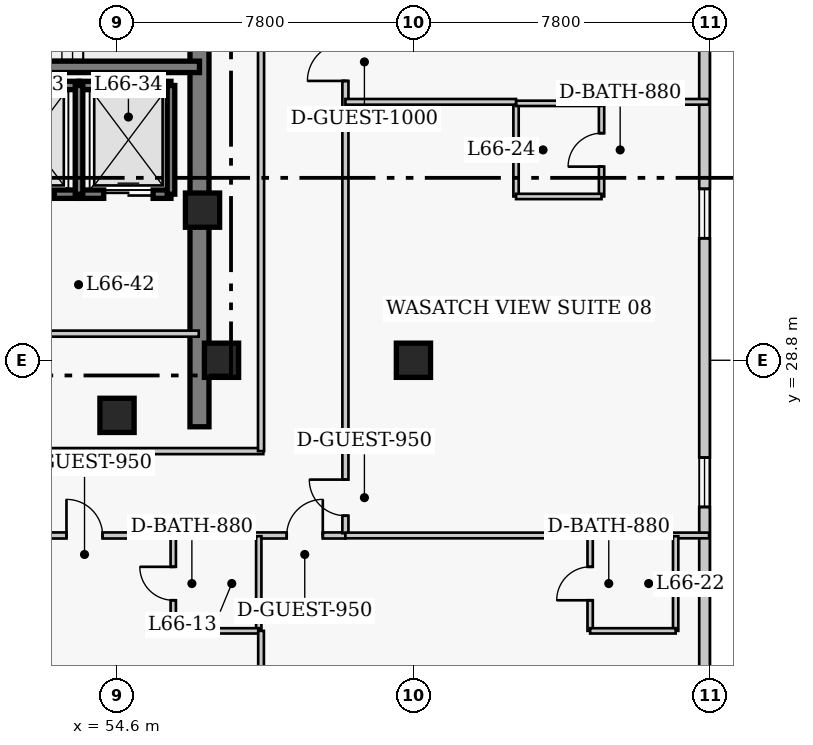
"""IFC4 building model, lengths in metres.
Left out: names, types, materials, properties, quantities, classifications, styles, units other than length and angle.
Written with IfcOpenShell. Run it as: python <this file> out.ifc"""

import sys

from ifc_helpers import new_model, si_unit, direction, frame, frame_2d, origin, origin_2d, place, context, subcontext, project, spatial, rectangle, extrude, element, fill, save


model = new_model("IFC4")
c1 = context("Model", 3, precision=1e-05, world=origin(), true_north=direction((0.0, 1.0)))
c2 = subcontext(c1, "Body", "Model", "MODEL_VIEW")
j1 = project(units=[si_unit("LENGTHUNIT", "METRE"), si_unit("PLANEANGLEUNIT", "RADIAN")], contexts=[c1])
p1 = place(None, origin())
s1 = spatial("IfcSite", under=j1, at=p1, CompositionType="ELEMENT")
p2 = place(p1, origin())
s2 = spatial("IfcBuilding", under=s1, at=p2, CompositionType="ELEMENT")
p3 = place(p2, frame((0.0, 0.0, 265.4)))
s3 = spatial("IfcBuildingStorey", under=s2, at=p3, CompositionType="ELEMENT", Elevation=265.4)
p4 = place(p3, frame((56.77, 27.05, 0.0), z_axis=(0.0, 0.0, 1.0), x_axis=(0.0, 1.0, 0.0)))
e1 = element("IfcWall", 1, at=p4, inside=s3, PredefinedType="SHEAR", context=c2, shape_type="SweptSolid", body=[
    extrude(rectangle(XDim=13.52, YDim=0.5, at=frame_2d((6.76, 0.0))), origin(), (0.0, 0.0, 1.0), 4.0),
])
p5 = place(p3, frame((48.45, 36.52, 0.0), z_axis=(0.0, 0.0, 1.0), x_axis=(1.0, 0.0, 0.0)))
e2 = element("IfcWall", 2, at=p5, inside=s3, PredefinedType="SHEAR", context=c2, shape_type="SweptSolid", body=[
    extrude(rectangle(XDim=8.32, YDim=0.3, at=frame_2d((4.16, 0.0))), origin(), (0.0, 0.0, 1.0), 4.0),
])
for number, where, z_axis, x_axis in (
    (3, (62.4, 28.8, 0.0), (0.0, 0.0, 1.0), (1.0, 0.0, 0.0)),
    (4, (57.35, 28.8, 0.0), (0.0, 0.0, 1.0), (1.0, 0.0, 0.0)),
    (5, (54.6, 27.35, 0.0), (0.0, 0.0, 1.0), (1.0, 0.0, 0.0)),
    (6, (56.85, 32.75, 0.0), (0.0, 0.0, 1.0), (1.0, 0.0, 0.0)),
):
    element("IfcColumn", number, at=place(p3, frame(where, z_axis=z_axis, x_axis=x_axis)), inside=s3, PredefinedType="COLUMN", context=c2, shape_type="SweptSolid", body=[
        extrude(rectangle(XDim=0.9, YDim=0.9, at=origin_2d()), origin(), (0.0, 0.0, 1.0), 4.0),
    ])
p6 = place(p3, frame((70.06, 13.36, 0.0), z_axis=(0.0, 0.0, 1.0), x_axis=(0.0, 1.0, 0.0)))
e7 = element("IfcWall", 7, at=p6, inside=s3, PredefinedType="SOLIDWALL", context=c2, shape_type="SweptSolid", body=[
    extrude(rectangle(XDim=30.88, YDim=0.28, at=frame_2d((15.44, 0.0))), origin(), (0.0, 0.0, 1.0), 3.76),
])
p7 = place(p6, frame((3.21, 0.0, 0.85)))
e8 = element("IfcOpeningElement", 8, at=p7, cuts=e7, PredefinedType="OPENING", context=c2, shape_type="SweptSolid", body=[
    extrude(rectangle(XDim=1.3, YDim=1.7, at=frame_2d((0.65, 0.85))), frame((0.0, 0.15, 0.0), z_axis=(0.0, -1.0, 0.0), x_axis=(1.0, 0.0, 0.0)), (0.0, 0.0, 1.0), 0.3),
])
p8 = place(p6, frame((11.58, 0.0, 0.85)))
e9 = element("IfcOpeningElement", 9, at=p8, cuts=e7, PredefinedType="OPENING", context=c2, shape_type="SweptSolid", body=[
    extrude(rectangle(XDim=1.3, YDim=1.7, at=frame_2d((0.65, 0.85))), frame((0.0, 0.15, 0.0), z_axis=(0.0, -1.0, 0.0), x_axis=(1.0, 0.0, 0.0)), (0.0, 0.0, 1.0), 0.3),
])
p9 = place(p6, frame((18.65, 0.0, 0.85)))
e10 = element("IfcOpeningElement", 10, at=p9, cuts=e7, PredefinedType="OPENING", context=c2, shape_type="SweptSolid", body=[
    extrude(rectangle(XDim=1.3, YDim=1.7, at=frame_2d((0.65, 0.85))), frame((0.0, 0.15, 0.0), z_axis=(0.0, -1.0, 0.0), x_axis=(1.0, 0.0, 0.0)), (0.0, 0.0, 1.0), 0.3),
])
p10 = place(p6, frame((26.37, 0.0, 0.85)))
e11 = element("IfcOpeningElement", 11, at=p10, cuts=e7, PredefinedType="OPENING", context=c2, shape_type="SweptSolid", body=[
    extrude(rectangle(XDim=1.3, YDim=1.7, at=frame_2d((0.65, 0.85))), frame((0.0, 0.15, 0.0), z_axis=(0.0, -1.0, 0.0), x_axis=(1.0, 0.0, 0.0)), (0.0, 0.0, 1.0), 0.3),
])
p11 = place(p3, frame((51.18, 36.03, 0.0), z_axis=(0.0, 0.0, 1.0), x_axis=(1.0, 0.0, 0.0)))
e12 = element("IfcWall", 12, at=p11, inside=s3, PredefinedType="SHEAR", context=c2, shape_type="SweptSolid", body=[
    extrude(rectangle(XDim=2.42, YDim=0.22, at=frame_2d((1.21, 0.0))), origin(), (0.0, 0.0, 1.0), 4.0),
])
p12 = place(p3, frame((51.18, 33.17, 0.0), z_axis=(0.0, 0.0, 1.0), x_axis=(1.0, 0.0, 0.0)))
e13 = element("IfcWall", 13, at=p12, inside=s3, PredefinedType="SHEAR", context=c2, shape_type="SweptSolid", body=[
    extrude(rectangle(XDim=2.42, YDim=0.22, at=frame_2d((1.21, 0.0))), origin(), (0.0, 0.0, 1.0), 4.0),
])
p13 = place(p12, frame((0.47, 0.0, 0.0)))
e14 = element("IfcOpeningElement", 14, at=p13, cuts=e13, PredefinedType="OPENING", context=c2, shape_type="SweptSolid", body=[
    extrude(rectangle(XDim=1.3, YDim=2.15, at=frame_2d((0.65, 1.075))), frame((0.0, 0.12, 0.0), z_axis=(0.0, -1.0, 0.0), x_axis=(1.0, 0.0, 0.0)), (0.0, 0.0, 1.0), 0.24),
])
p14 = place(p3, frame((53.6, 36.03, 0.0), z_axis=(0.0, 0.0, 1.0), x_axis=(1.0, 0.0, 0.0)))
e15 = element("IfcWall", 15, at=p14, inside=s3, PredefinedType="SHEAR", context=c2, shape_type="SweptSolid", body=[
    extrude(rectangle(XDim=2.42, YDim=0.22, at=frame_2d((1.21, 0.0))), origin(), (0.0, 0.0, 1.0), 4.0),
])
p15 = place(p3, frame((53.6, 33.17, 0.0), z_axis=(0.0, 0.0, 1.0), x_axis=(1.0, 0.0, 0.0)))
e16 = element("IfcWall", 16, at=p15, inside=s3, PredefinedType="SHEAR", context=c2, shape_type="SweptSolid", body=[
    extrude(rectangle(XDim=2.42, YDim=0.22, at=frame_2d((1.21, 0.0))), origin(), (0.0, 0.0, 1.0), 4.0),
])
p16 = place(p15, frame((0.65, 0.0, 0.0)))
e17 = element("IfcOpeningElement", 17, at=p16, cuts=e16, PredefinedType="OPENING", context=c2, shape_type="SweptSolid", body=[
    extrude(rectangle(XDim=1.3, YDim=2.15, at=frame_2d((0.65, 1.075))), frame((0.0, 0.12, 0.0), z_axis=(0.0, -1.0, 0.0), x_axis=(1.0, 0.0, 0.0)), (0.0, 0.0, 1.0), 0.24),
])
for number, where, z_axis, x_axis in (
    (18, (53.6, 33.17, 0.0), (0.0, 0.0, 1.0), (0.0, 1.0, 0.0)),
    (19, (56.02, 33.17, 0.0), (0.0, 0.0, 1.0), (0.0, 1.0, 0.0)),
):
    element("IfcWall", number, at=place(p3, frame(where, z_axis=z_axis, x_axis=x_axis)), inside=s3, PredefinedType="SHEAR", context=c2, shape_type="SweptSolid", body=[
        extrude(rectangle(XDim=2.86, YDim=0.2, at=frame_2d((1.43, 0.0))), origin(), (0.0, 0.0, 1.0), 4.0),
    ])
p17 = place(p3, frame((51.12, 29.5, 0.0), z_axis=(0.0, 0.0, 1.0), x_axis=(1.0, 0.0, 0.0)))
e20 = element("IfcWall", 20, at=p17, inside=s3, PredefinedType="PARTITIONING", context=c2, shape_type="SweptSolid", body=[
    extrude(rectangle(XDim=5.63, YDim=0.16, at=frame_2d((2.815, 0.0))), origin(), (0.0, 0.0, 1.0), 3.76),
])
p18 = place(p3, frame((35.85, 26.41, 0.0), z_axis=(0.0, 0.0, 1.0), x_axis=(1.0, 0.0, 0.0)))
e21 = element("IfcWall", 21, at=p18, inside=s3, PredefinedType="PARTITIONING", context=c2, shape_type="SweptSolid", body=[
    extrude(rectangle(XDim=22.6, YDim=0.16, at=frame_2d((11.3, 0.0))), origin(), (0.0, 0.0, 1.0), 3.76),
])
p19 = place(p18, frame((4.55, 0.0, 0.0)))
e22 = element("IfcOpeningElement", 22, at=p19, cuts=e21, PredefinedType="OPENING", context=c2, shape_type="SweptSolid", body=[
    extrude(rectangle(XDim=1.0, YDim=2.15, at=frame_2d((0.5, 1.075))), frame((0.0, 0.09, 0.0), z_axis=(0.0, -1.0, 0.0), x_axis=(1.0, 0.0, 0.0)), (0.0, 0.0, 1.0), 0.18),
])
p20 = place(p18, frame((12.05, 0.0, 0.0)))
e23 = element("IfcOpeningElement", 23, at=p20, cuts=e21, PredefinedType="OPENING", context=c2, shape_type="SweptSolid", body=[
    extrude(rectangle(XDim=1.0, YDim=2.15, at=frame_2d((0.5, 1.075))), frame((0.0, 0.09, 0.0), z_axis=(0.0, -1.0, 0.0), x_axis=(1.0, 0.0, 0.0)), (0.0, 0.0, 1.0), 0.18),
])
p21 = place(p3, frame((35.8, 24.19, 0.0), z_axis=(0.0, 0.0, 1.0), x_axis=(1.0, 0.0, 0.0)))
e24 = element("IfcWall", 24, at=p21, inside=s3, PredefinedType="PARTITIONING", context=c2, shape_type="SweptSolid", body=[
    extrude(rectangle(XDim=24.81, YDim=0.16, at=frame_2d((12.405, 0.0))), origin(), (0.0, 0.0, 1.0), 3.76),
])
p22 = place(p21, frame((2.115, 0.0, 0.0)))
e25 = element("IfcOpeningElement", 25, at=p22, cuts=e24, PredefinedType="OPENING", context=c2, shape_type="SweptSolid", body=[
    extrude(rectangle(XDim=0.95, YDim=2.1, at=frame_2d((0.475, 1.05))), frame((0.0, 0.09, 0.0), z_axis=(0.0, -1.0, 0.0), x_axis=(1.0, 0.0, 0.0)), (0.0, 0.0, 1.0), 0.18),
])
p23 = place(p21, frame((11.345, 0.0, 0.0)))
e26 = element("IfcOpeningElement", 26, at=p23, cuts=e24, PredefinedType="OPENING", context=c2, shape_type="SweptSolid", body=[
    extrude(rectangle(XDim=1.0, YDim=2.15, at=frame_2d((0.5, 1.075))), frame((0.0, 0.09, 0.0), z_axis=(0.0, -1.0, 0.0), x_axis=(1.0, 0.0, 0.0)), (0.0, 0.0, 1.0), 0.18),
])
p24 = place(p21, frame((17.47, 0.0, 0.0)))
e27 = element("IfcOpeningElement", 27, at=p24, cuts=e24, PredefinedType="OPENING", context=c2, shape_type="SweptSolid", body=[
    extrude(rectangle(XDim=0.95, YDim=2.1, at=frame_2d((0.475, 1.05))), frame((0.0, 0.09, 0.0), z_axis=(0.0, -1.0, 0.0), x_axis=(1.0, 0.0, 0.0)), (0.0, 0.0, 1.0), 0.18),
])
p25 = place(p21, frame((23.265, 0.0, 0.0)))
e28 = element("IfcOpeningElement", 28, at=p25, cuts=e24, PredefinedType="OPENING", context=c2, shape_type="SweptSolid", body=[
    extrude(rectangle(XDim=0.95, YDim=2.1, at=frame_2d((0.475, 1.05))), frame((0.0, 0.09, 0.0), z_axis=(0.0, -1.0, 0.0), x_axis=(1.0, 0.0, 0.0)), (0.0, 0.0, 1.0), 0.18),
])
p26 = place(p3, frame((60.61, 24.25, 0.0), z_axis=(0.0, 0.0, 1.0), x_axis=(0.0, 1.0, 0.0)))
e29 = element("IfcWall", 29, at=p26, inside=s3, PredefinedType="PARTITIONING", context=c2, shape_type="SweptSolid", body=[
    extrude(rectangle(XDim=16.4, YDim=0.16, at=frame_2d((8.2, 0.0))), origin(), (0.0, 0.0, 1.0), 3.76),
])
p27 = place(p26, frame((0.46, 0.0, 0.0)))
e30 = element("IfcOpeningElement", 30, at=p27, cuts=e29, PredefinedType="OPENING", context=c2, shape_type="SweptSolid", body=[
    extrude(rectangle(XDim=0.95, YDim=2.1, at=frame_2d((0.475, 1.05))), frame((0.0, 0.09, 0.0), z_axis=(0.0, -1.0, 0.0), x_axis=(1.0, 0.0, 0.0)), (0.0, 0.0, 1.0), 0.18),
])
p28 = place(p26, frame((11.9, 0.0, 0.0)))
e31 = element("IfcOpeningElement", 31, at=p28, cuts=e29, PredefinedType="OPENING", context=c2, shape_type="SweptSolid", body=[
    extrude(rectangle(XDim=1.0, YDim=2.15, at=frame_2d((0.5, 1.075))), frame((0.0, 0.09, 0.0), z_axis=(0.0, -1.0, 0.0), x_axis=(1.0, 0.0, 0.0)), (0.0, 0.0, 1.0), 0.18),
])
p29 = place(p3, frame((58.39, 26.41, 0.0), z_axis=(0.0, 0.0, 1.0), x_axis=(0.0, 1.0, 0.0)))
e32 = element("IfcWall", 32, at=p29, inside=s3, PredefinedType="PARTITIONING", context=c2, shape_type="SweptSolid", body=[
    extrude(rectangle(XDim=14.24, YDim=0.16, at=frame_2d((7.12, 0.0))), origin(), (0.0, 0.0, 1.0), 3.76),
])
p30 = place(p3, frame((56.08, 21.68, 0.0), z_axis=(0.0, 0.0, 1.0), x_axis=(0.0, 1.0, 0.0)))
e33 = element("IfcWall", 33, at=p30, inside=s3, PredefinedType="PLUMBINGWALL", context=c2, shape_type="SweptSolid", body=[
    extrude(rectangle(XDim=2.49, YDim=0.14, at=frame_2d((1.245, 0.0))), origin(), (0.0, 0.0, 1.0), 3.76),
])
p31 = place(p30, frame((0.805, 0.0, 0.0)))
e34 = element("IfcOpeningElement", 34, at=p31, cuts=e33, PredefinedType="OPENING", context=c2, shape_type="SweptSolid", body=[
    extrude(rectangle(XDim=0.88, YDim=2.05, at=frame_2d((0.44, 1.025))), frame((0.0, 0.08, 0.0), z_axis=(0.0, -1.0, 0.0), x_axis=(1.0, 0.0, 0.0)), (0.0, 0.0, 1.0), 0.16),
])
p32 = place(p3, frame((58.33, 21.68, 0.0), z_axis=(0.0, 0.0, 1.0), x_axis=(0.0, 1.0, 0.0)))
e35 = element("IfcWall", 35, at=p32, inside=s3, PredefinedType="PLUMBINGWALL", context=c2, shape_type="SweptSolid", body=[
    extrude(rectangle(XDim=2.49, YDim=0.14, at=frame_2d((1.245, 0.0))), origin(), (0.0, 0.0, 1.0), 3.76),
])
p33 = place(p3, frame((56.08, 21.68, 0.0), z_axis=(0.0, 0.0, 1.0), x_axis=(1.0, 0.0, 0.0)))
e36 = element("IfcWall", 36, at=p33, inside=s3, PredefinedType="PLUMBINGWALL", context=c2, shape_type="SweptSolid", body=[
    extrude(rectangle(XDim=2.25, YDim=0.14, at=frame_2d((1.125, 0.0))), origin(), (0.0, 0.0, 1.0), 3.76),
])
p34 = place(p3, frame((58.39, 9.72, 0.0), z_axis=(0.0, 0.0, 1.0), x_axis=(0.0, 1.0, 0.0)))
e37 = element("IfcWall", 37, at=p34, inside=s3, PredefinedType="PARTITIONING", context=c2, shape_type="SweptSolid", body=[
    extrude(rectangle(XDim=11.96, YDim=0.15, at=frame_2d((5.98, 0.0))), origin(), (0.0, 0.0, 1.0), 3.356),
])
p35 = place(p3, frame((60.61, 24.19, 0.0), z_axis=(0.0, 0.0, 1.0), x_axis=(1.0, 0.0, 0.0)))
e38 = element("IfcWall", 38, at=p35, inside=s3, PredefinedType="PARTITIONING", context=c2, shape_type="SweptSolid", body=[
    extrude(rectangle(XDim=9.57, YDim=0.15, at=frame_2d((4.785, 0.0))), origin(), (0.0, 0.0, 1.0), 3.76),
])
p36 = place(p3, frame((67.05, 21.68, 0.0), z_axis=(0.0, 0.0, 1.0), x_axis=(0.0, 1.0, 0.0)))
e39 = element("IfcWall", 39, at=p36, inside=s3, PredefinedType="PLUMBINGWALL", context=c2, shape_type="SweptSolid", body=[
    extrude(rectangle(XDim=2.49, YDim=0.14, at=frame_2d((1.245, 0.0))), origin(), (0.0, 0.0, 1.0), 3.76),
])
p37 = place(p36, frame((0.805, 0.0, 0.0)))
e40 = element("IfcOpeningElement", 40, at=p37, cuts=e39, PredefinedType="OPENING", context=c2, shape_type="SweptSolid", body=[
    extrude(rectangle(XDim=0.88, YDim=2.05, at=frame_2d((0.44, 1.025))), frame((0.0, 0.08, 0.0), z_axis=(0.0, -1.0, 0.0), x_axis=(1.0, 0.0, 0.0)), (0.0, 0.0, 1.0), 0.16),
])
p38 = place(p3, frame((69.3, 21.68, 0.0), z_axis=(0.0, 0.0, 1.0), x_axis=(0.0, 1.0, 0.0)))
e41 = element("IfcWall", 41, at=p38, inside=s3, PredefinedType="PLUMBINGWALL", context=c2, shape_type="SweptSolid", body=[
    extrude(rectangle(XDim=2.49, YDim=0.14, at=frame_2d((1.245, 0.0))), origin(), (0.0, 0.0, 1.0), 3.76),
])
p39 = place(p3, frame((67.05, 21.68, 0.0), z_axis=(0.0, 0.0, 1.0), x_axis=(1.0, 0.0, 0.0)))
e42 = element("IfcWall", 42, at=p39, inside=s3, PredefinedType="PLUMBINGWALL", context=c2, shape_type="SweptSolid", body=[
    extrude(rectangle(XDim=2.25, YDim=0.14, at=frame_2d((1.125, 0.0))), origin(), (0.0, 0.0, 1.0), 3.76),
])
p40 = place(p3, frame((65.1, 33.11, 0.0), z_axis=(0.0, 0.0, 1.0), x_axis=(0.0, 1.0, 0.0)))
e43 = element("IfcWall", 43, at=p40, inside=s3, PredefinedType="PLUMBINGWALL", context=c2, shape_type="SweptSolid", body=[
    extrude(rectangle(XDim=2.45, YDim=0.14, at=frame_2d((1.225, 0.0))), origin(), (0.0, 0.0, 1.0), 3.76),
])
p41 = place(p3, frame((67.35, 33.11, 0.0), z_axis=(0.0, 0.0, 1.0), x_axis=(0.0, 1.0, 0.0)))
e44 = element("IfcWall", 44, at=p41, inside=s3, PredefinedType="PLUMBINGWALL", context=c2, shape_type="SweptSolid", body=[
    extrude(rectangle(XDim=2.45, YDim=0.14, at=frame_2d((1.225, 0.0))), origin(), (0.0, 0.0, 1.0), 3.76),
])
p42 = place(p41, frame((0.785, 0.0, 0.0)))
e45 = element("IfcOpeningElement", 45, at=p42, cuts=e44, PredefinedType="OPENING", context=c2, shape_type="SweptSolid", body=[
    extrude(rectangle(XDim=0.88, YDim=2.05, at=frame_2d((0.44, 1.025))), frame((0.0, 0.08, 0.0), z_axis=(0.0, -1.0, 0.0), x_axis=(1.0, 0.0, 0.0)), (0.0, 0.0, 1.0), 0.16),
])
for number, where, z_axis, x_axis in (
    (46, (65.1, 33.11, 0.0), (0.0, 0.0, 1.0), (1.0, 0.0, 0.0)),
    (47, (65.1, 35.56, 0.0), (0.0, 0.0, 1.0), (1.0, 0.0, 0.0)),
):
    element("IfcWall", number, at=place(p3, frame(where, z_axis=z_axis, x_axis=x_axis)), inside=s3, PredefinedType="PLUMBINGWALL", context=c2, shape_type="SweptSolid", body=[
        extrude(rectangle(XDim=2.25, YDim=0.14, at=frame_2d((1.125, 0.0))), origin(), (0.0, 0.0, 1.0), 3.76),
    ])
p43 = place(p3, frame((60.61, 35.6, 0.0), z_axis=(0.0, 0.0, 1.0), x_axis=(1.0, 0.0, 0.0)))
e48 = element("IfcWall", 48, at=p43, inside=s3, PredefinedType="PARTITIONING", context=c2, shape_type="SweptSolid", body=[
    extrude(rectangle(XDim=4.49, YDim=0.15, at=frame_2d((2.245, 0.0))), origin(), (0.0, 0.0, 1.0), 3.76),
])
p44 = place(p3, frame((67.35, 35.6, 0.0), z_axis=(0.0, 0.0, 1.0), x_axis=(1.0, 0.0, 0.0)))
e49 = element("IfcWall", 49, at=p44, inside=s3, PredefinedType="PARTITIONING", context=c2, shape_type="SweptSolid", body=[
    extrude(rectangle(XDim=2.83, YDim=0.15, at=frame_2d((1.415, 0.0))), origin(), (0.0, 0.0, 1.0), 3.76),
])
p45 = place(p8, origin())
e50 = element("IfcWindow", 50, at=p45, inside=s3, PartitioningType="SINGLE_PANEL", PredefinedType="WINDOW", context=c2, shape_type="SweptSolid", body=[
    extrude(rectangle(XDim=1.3, YDim=1.7, at=frame_2d((0.65, 0.85))), frame((0.0, 0.03, 0.0), z_axis=(0.0, -1.0, 0.0), x_axis=(1.0, 0.0, 0.0)), (0.0, 0.0, 1.0), 0.06),
])
fill(e9, e50)
p46 = place(p9, origin())
e51 = element("IfcWindow", 51, at=p46, inside=s3, PartitioningType="SINGLE_PANEL", PredefinedType="WINDOW", context=c2, shape_type="SweptSolid", body=[
    extrude(rectangle(XDim=1.3, YDim=1.7, at=frame_2d((0.65, 0.85))), frame((0.0, 0.03, 0.0), z_axis=(0.0, -1.0, 0.0), x_axis=(1.0, 0.0, 0.0)), (0.0, 0.0, 1.0), 0.06),
])
fill(e10, e51)
p47 = place(p13, origin())
e52 = element("IfcDoor", 52, at=p47, inside=s3, OperationType="DOUBLE_DOOR_SLIDING", PredefinedType="DOOR", context=c2, shape_type="SweptSolid", body=[
    extrude(rectangle(XDim=1.3, YDim=2.15, at=frame_2d((0.65, 1.075))), frame((0.0, 0.025, 0.0), z_axis=(0.0, -1.0, 0.0), x_axis=(1.0, 0.0, 0.0)), (0.0, 0.0, 1.0), 0.05),
])
fill(e14, e52)
p48 = place(p16, origin())
e53 = element("IfcDoor", 53, at=p48, inside=s3, OperationType="DOUBLE_DOOR_SLIDING", PredefinedType="DOOR", context=c2, shape_type="SweptSolid", body=[
    extrude(rectangle(XDim=1.3, YDim=2.15, at=frame_2d((0.65, 1.075))), frame((0.0, 0.025, 0.0), z_axis=(0.0, -1.0, 0.0), x_axis=(1.0, 0.0, 0.0)), (0.0, 0.0, 1.0), 0.05),
])
fill(e17, e53)
p49 = place(p31, origin())
e54 = element("IfcDoor", 54, at=p49, inside=s3, OperationType="SINGLE_SWING_RIGHT", PredefinedType="DOOR", context=c2, shape_type="SweptSolid", body=[
    extrude(rectangle(XDim=0.88, YDim=2.05, at=frame_2d((0.44, 1.025))), frame((0.0, 0.025, 0.0), z_axis=(0.0, -1.0, 0.0), x_axis=(1.0, 0.0, 0.0)), (0.0, 0.0, 1.0), 0.05),
])
fill(e34, e54)
p50 = place(p24, origin())
e55 = element("IfcDoor", 55, at=p50, inside=s3, OperationType="SINGLE_SWING_LEFT", PredefinedType="DOOR", context=c2, shape_type="SweptSolid", body=[
    extrude(rectangle(XDim=0.95, YDim=2.1, at=frame_2d((0.475, 1.05))), frame((0.0, 0.025, 0.0), z_axis=(0.0, -1.0, 0.0), x_axis=(1.0, 0.0, 0.0)), (0.0, 0.0, 1.0), 0.05),
])
fill(e27, e55)
p51 = place(p37, origin())
e56 = element("IfcDoor", 56, at=p51, inside=s3, OperationType="SINGLE_SWING_LEFT", PredefinedType="DOOR", context=c2, shape_type="SweptSolid", body=[
    extrude(rectangle(XDim=0.88, YDim=2.05, at=frame_2d((0.44, 1.025))), frame((0.0, 0.025, 0.0), z_axis=(0.0, -1.0, 0.0), x_axis=(1.0, 0.0, 0.0)), (0.0, 0.0, 1.0), 0.05),
])
fill(e40, e56)
p52 = place(p25, origin())
e57 = element("IfcDoor", 57, at=p52, inside=s3, OperationType="SINGLE_SWING_RIGHT", PredefinedType="DOOR", context=c2, shape_type="SweptSolid", body=[
    extrude(rectangle(XDim=0.95, YDim=2.1, at=frame_2d((0.475, 1.05))), frame((0.0, 0.025, 0.0), z_axis=(0.0, -1.0, 0.0), x_axis=(1.0, 0.0, 0.0)), (0.0, 0.0, 1.0), 0.05),
])
fill(e28, e57)
p53 = place(p42, origin())
e58 = element("IfcDoor", 58, at=p53, inside=s3, OperationType="SINGLE_SWING_LEFT", PredefinedType="DOOR", context=c2, shape_type="SweptSolid", body=[
    extrude(rectangle(XDim=0.88, YDim=2.05, at=frame_2d((0.44, 1.025))), frame((0.0, 0.025, 0.0), z_axis=(0.0, -1.0, 0.0), x_axis=(1.0, 0.0, 0.0)), (0.0, 0.0, 1.0), 0.05),
])
fill(e45, e58)
p54 = place(p27, origin())
e59 = element("IfcDoor", 59, at=p54, inside=s3, OperationType="SINGLE_SWING_RIGHT", PredefinedType="DOOR", context=c2, shape_type="SweptSolid", body=[
    extrude(rectangle(XDim=0.95, YDim=2.1, at=frame_2d((0.475, 1.05))), frame((0.0, 0.025, 0.0), z_axis=(0.0, -1.0, 0.0), x_axis=(1.0, 0.0, 0.0)), (0.0, 0.0, 1.0), 0.05),
])
fill(e30, e59)
p55 = place(p28, origin())
e60 = element("IfcDoor", 60, at=p55, inside=s3, OperationType="SINGLE_SWING_LEFT", PredefinedType="DOOR", context=c2, shape_type="SweptSolid", body=[
    extrude(rectangle(XDim=1.0, YDim=2.15, at=frame_2d((0.5, 1.075))), frame((0.0, 0.025, 0.0), z_axis=(0.0, -1.0, 0.0), x_axis=(1.0, 0.0, 0.0)), (0.0, 0.0, 1.0), 0.05),
])
fill(e31, e60)
save(model, sys.argv[1])
